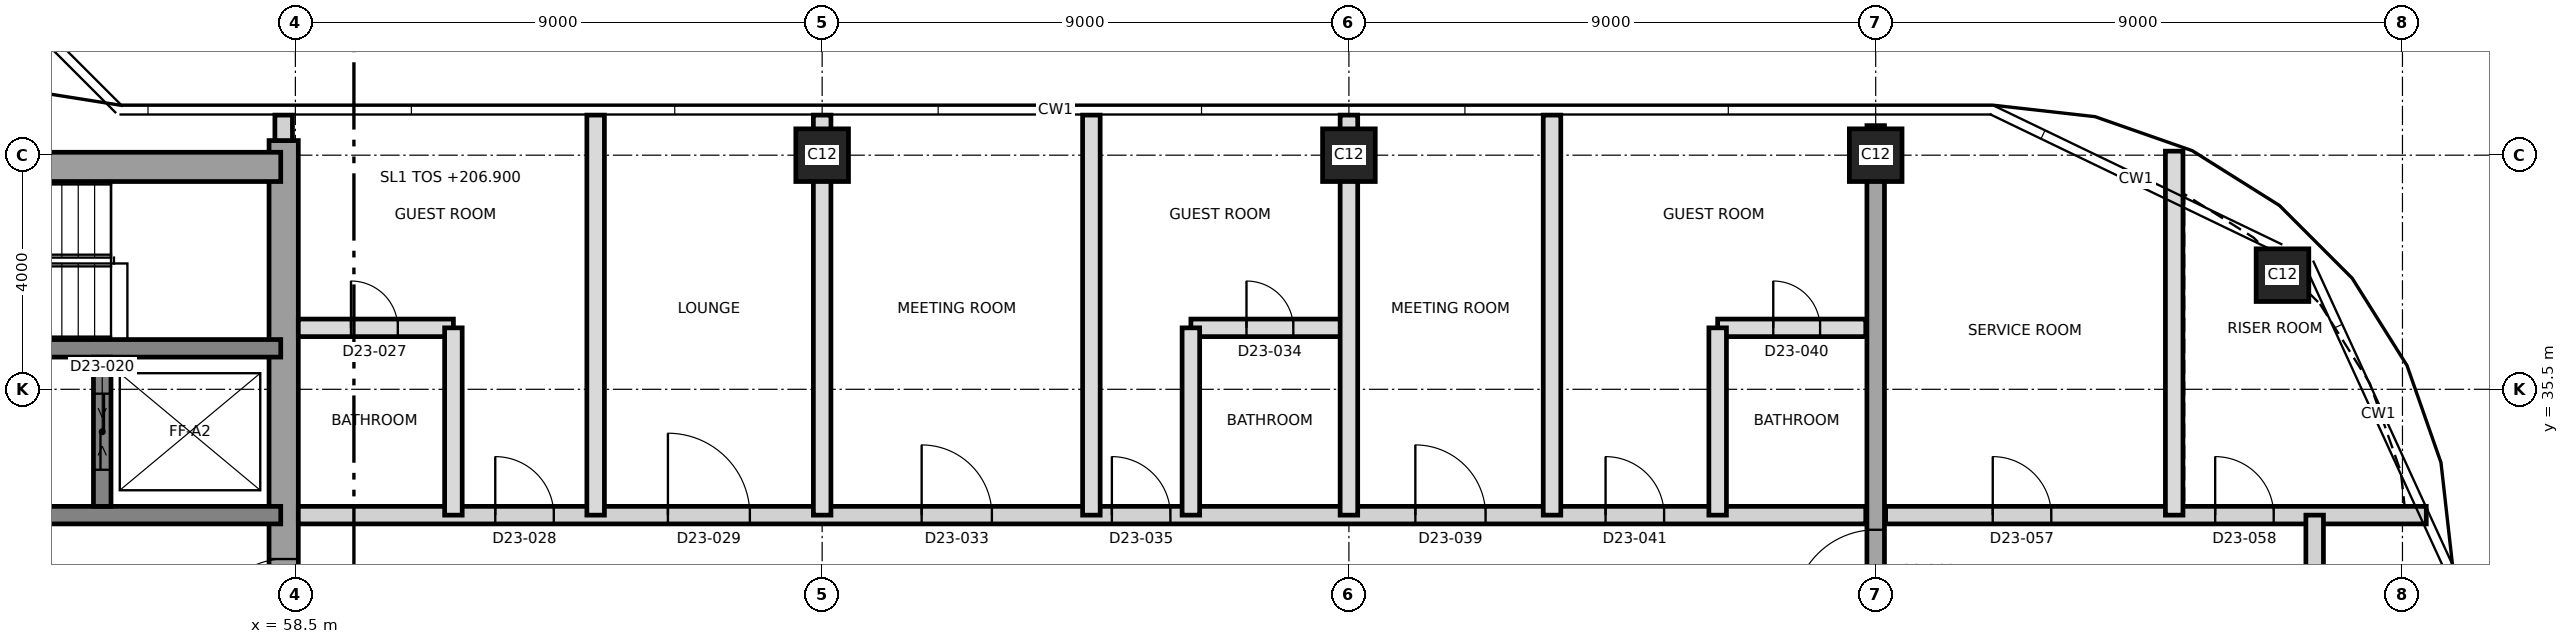
"""IFC4 building model, lengths in metres.
Left out: names, types, materials, properties, quantities, classifications, styles, units other than length and angle.
Written with IfcOpenShell. Run it as: python <this file> out.ifc"""

import sys

from ifc_helpers import new_model, si_unit, direction, frame, frame_2d, origin, origin_2d, place, context, subcontext, project, spatial, rectangle, extrude, element, fill, save


model = new_model("IFC4")
c1 = context("Model", 3, precision=1e-05, world=origin(), true_north=direction((0.0, 1.0)))
c2 = subcontext(c1, "Body", "Model", "MODEL_VIEW")
j1 = project(units=[si_unit("LENGTHUNIT", "METRE"), si_unit("PLANEANGLEUNIT", "RADIAN")], contexts=[c1])
p1 = place(None, origin())
s1 = spatial("IfcSite", under=j1, at=p1, CompositionType="ELEMENT")
p2 = place(p1, origin())
s2 = spatial("IfcBuilding", under=s1, at=p2, CompositionType="ELEMENT")
p3 = place(p2, frame((0.0, 0.0, 206.9)))
s3 = spatial("IfcBuildingStorey", under=s2, at=p3, CompositionType="ELEMENT", Elevation=206.9)
p4 = place(p3, frame((58.3, 21.25, 0.0), z_axis=(0.0, 0.0, 1.0), x_axis=(0.0, 1.0, 0.0)))
e1 = element("IfcWall", 1, at=p4, inside=s3, PredefinedType="SHEAR", context=c2, shape_type="SweptSolid", body=[
    extrude(rectangle(XDim=18.5, YDim=0.5, at=frame_2d((9.25, 0.0))), origin(), (0.0, 0.0, 1.0), 3.7),
])
p5 = place(p4, frame((10.15, 0.0, 0.0)))
e2 = element("IfcOpeningElement", 2, at=p5, cuts=e1, PredefinedType="OPENING", context=c2, shape_type="SweptSolid", body=[
    extrude(rectangle(XDim=1.2, YDim=2.1, at=frame_2d((0.6, 1.05))), frame((0.0, 0.26, 0.0), z_axis=(0.0, -1.0, 0.0), x_axis=(1.0, 0.0, 0.0)), (0.0, 0.0, 1.0), 0.52),
])
p6 = place(p3, frame((31.25, 39.3, 0.0), z_axis=(0.0, 0.0, 1.0), x_axis=(1.0, 0.0, 0.0)))
e3 = element("IfcWall", 3, at=p6, inside=s3, PredefinedType="SHEAR", context=c2, shape_type="SweptSolid", body=[
    extrude(rectangle(XDim=27.0, YDim=0.5, at=frame_2d((13.5, 0.0))), origin(), (0.0, 0.0, 1.0), 3.7),
])
p7 = place(p6, frame((10.45, 0.0, 0.0)))
e4 = element("IfcOpeningElement", 4, at=p7, cuts=e3, PredefinedType="OPENING", context=c2, shape_type="SweptSolid", body=[
    extrude(rectangle(XDim=1.2, YDim=2.1, at=frame_2d((0.6, 1.05))), frame((0.0, 0.26, 0.0), z_axis=(0.0, -1.0, 0.0), x_axis=(1.0, 0.0, 0.0)), (0.0, 0.0, 1.0), 0.52),
])
p8 = place(p3, frame((31.75, 33.35, 0.0), z_axis=(0.0, 0.0, 1.0), x_axis=(1.0, 0.0, 0.0)))
e5 = element("IfcWall", 5, at=p8, inside=s3, PredefinedType="SHEAR", context=c2, shape_type="SweptSolid", body=[
    extrude(rectangle(XDim=26.5, YDim=0.3, at=frame_2d((13.25, 0.0))), origin(), (0.0, 0.0, 1.0), 3.7),
])
p9 = place(p8, frame((13.9, 0.0, 0.0)))
e6 = element("IfcOpeningElement", 6, at=p9, cuts=e5, PredefinedType="OPENING", context=c2, shape_type="SweptSolid", body=[
    extrude(rectangle(XDim=1.4, YDim=2.1, at=frame_2d((0.7, 1.05))), frame((0.0, 0.16, 0.0), z_axis=(0.0, -1.0, 0.0), x_axis=(1.0, 0.0, 0.0)), (0.0, 0.0, 1.0), 0.32),
])
p10 = place(p8, frame((5.375, 0.0, 0.0)))
e7 = element("IfcOpeningElement", 7, at=p10, cuts=e5, PredefinedType="OPENING", context=c2, shape_type="SweptSolid", body=[
    extrude(rectangle(XDim=1.2, YDim=2.1, at=frame_2d((0.6, 1.05))), frame((0.0, 0.16, 0.0), z_axis=(0.0, -1.0, 0.0), x_axis=(1.0, 0.0, 0.0)), (0.0, 0.0, 1.0), 0.32),
])
p11 = place(p8, frame((19.925, 0.0, 0.0)))
e8 = element("IfcOpeningElement", 8, at=p11, cuts=e5, PredefinedType="OPENING", context=c2, shape_type="SweptSolid", body=[
    extrude(rectangle(XDim=1.2, YDim=2.1, at=frame_2d((0.6, 1.05))), frame((0.0, 0.16, 0.0), z_axis=(0.0, -1.0, 0.0), x_axis=(1.0, 0.0, 0.0)), (0.0, 0.0, 1.0), 0.32),
])
p12 = place(p3, frame((43.5, 36.2, 0.0), z_axis=(0.0, 0.0, 1.0), x_axis=(1.0, 0.0, 0.0)))
e9 = element("IfcWall", 9, at=p12, inside=s3, PredefinedType="SHEAR", context=c2, shape_type="SweptSolid", body=[
    extrude(rectangle(XDim=14.75, YDim=0.3, at=frame_2d((7.375, 0.0))), origin(), (0.0, 0.0, 1.0), 3.7),
])
p13 = place(p12, frame((6.9, 0.0, 0.0)))
e10 = element("IfcOpeningElement", 10, at=p13, cuts=e9, PredefinedType="OPENING", context=c2, shape_type="SweptSolid", body=[
    extrude(rectangle(XDim=1.2, YDim=2.1, at=frame_2d((0.6, 1.05))), frame((0.0, 0.16, 0.0), z_axis=(0.0, -1.0, 0.0), x_axis=(1.0, 0.0, 0.0)), (0.0, 0.0, 1.0), 0.32),
])
p14 = place(p12, frame((0.7, 0.0, 0.0)))
e11 = element("IfcOpeningElement", 11, at=p14, cuts=e9, PredefinedType="OPENING", context=c2, shape_type="SweptSolid", body=[
    extrude(rectangle(XDim=1.3, YDim=2.4, at=frame_2d((0.65, 1.2))), frame((0.0, 0.16, 0.0), z_axis=(0.0, -1.0, 0.0), x_axis=(1.0, 0.0, 0.0)), (0.0, 0.0, 1.0), 0.32),
])
p15 = place(p12, frame((3.7, 0.0, 0.0)))
e12 = element("IfcOpeningElement", 12, at=p15, cuts=e9, PredefinedType="OPENING", context=c2, shape_type="SweptSolid", body=[
    extrude(rectangle(XDim=1.3, YDim=2.4, at=frame_2d((0.65, 1.2))), frame((0.0, 0.16, 0.0), z_axis=(0.0, -1.0, 0.0), x_axis=(1.0, 0.0, 0.0)), (0.0, 0.0, 1.0), 0.32),
])
p16 = place(p3, frame((55.2, 33.5, 0.0), z_axis=(0.0, 0.0, 1.0), x_axis=(0.0, 1.0, 0.0)))
e13 = element("IfcWall", 13, at=p16, inside=s3, PredefinedType="SHEAR", context=c2, shape_type="SweptSolid", body=[
    extrude(rectangle(XDim=2.55, YDim=0.3, at=frame_2d((1.275, 0.0))), origin(), (0.0, 0.0, 1.0), 3.7),
])
p17 = place(p16, frame((0.625, 0.0, 0.0)))
e14 = element("IfcOpeningElement", 14, at=p17, cuts=e13, PredefinedType="OPENING", context=c2, shape_type="SweptSolid", body=[
    extrude(rectangle(XDim=1.3, YDim=2.4, at=frame_2d((0.65, 1.2))), frame((0.0, 0.16, 0.0), z_axis=(0.0, -1.0, 0.0), x_axis=(1.0, 0.0, 0.0)), (0.0, 0.0, 1.0), 0.32),
])
for number, where, z_axis, x_axis in (
    (15, (92.45, 37.45, 0.0), (0.0, 0.0, 1.0), (1.0, 0.0, 0.0)),
    (16, (67.5, 39.5, 0.0), (0.0, 0.0, 1.0), (1.0, 0.0, 0.0)),
    (17, (76.5, 39.5, 0.0), (0.0, 0.0, 1.0), (1.0, 0.0, 0.0)),
    (18, (85.5, 39.5, 0.0), (0.0, 0.0, 1.0), (1.0, 0.0, 0.0)),
):
    element("IfcColumn", number, at=place(p3, frame(where, z_axis=z_axis, x_axis=x_axis)), inside=s3, PredefinedType="COLUMN", context=c2, shape_type="SweptSolid", body=[
        extrude(rectangle(XDim=0.9, YDim=0.9, at=origin_2d()), origin(), (0.0, 0.0, 1.0), 3.7),
    ])
p18 = place(p3, frame((85.5, 20.995, 0.0), z_axis=(0.0, 0.0, 1.0), x_axis=(0.0, 1.0, 0.0)))
e19 = element("IfcWall", 19, at=p18, inside=s3, PredefinedType="SHEAR", context=c2, shape_type="SweptSolid", body=[
    extrude(rectangle(XDim=19.01, YDim=0.3, at=frame_2d((9.505, 0.0))), origin(), (0.0, 0.0, 1.0), 3.7),
])
p19 = place(p18, frame((10.705, 0.0, 0.0)))
e20 = element("IfcOpeningElement", 20, at=p19, cuts=e19, PredefinedType="OPENING", context=c2, shape_type="SweptSolid", body=[
    extrude(rectangle(XDim=1.4, YDim=2.1, at=frame_2d((0.7, 1.05))), frame((0.0, 0.16, 0.0), z_axis=(0.0, -1.0, 0.0), x_axis=(1.0, 0.0, 0.0)), (0.0, 0.0, 1.0), 0.32),
])
p20 = place(p3, frame((58.55, 33.35, 0.0), z_axis=(0.0, 0.0, 1.0), x_axis=(1.0, 0.0, 0.0)))
e21 = element("IfcWall", 21, at=p20, inside=s3, PredefinedType="PARTITIONING", context=c2, shape_type="SweptSolid", body=[
    extrude(rectangle(XDim=26.78, YDim=0.3, at=frame_2d((13.39, 0.0))), origin(), (0.0, 0.0, 1.0), 3.4),
])
p21 = place(p20, frame((3.365, 0.0, 0.0)))
e22 = element("IfcOpeningElement", 22, at=p21, cuts=e21, PredefinedType="OPENING", context=c2, shape_type="SweptSolid", body=[
    extrude(rectangle(XDim=1.0, YDim=2.1, at=frame_2d((0.5, 1.05))), frame((0.0, 0.16, 0.0), z_axis=(0.0, -1.0, 0.0), x_axis=(1.0, 0.0, 0.0)), (0.0, 0.0, 1.0), 0.32),
])
p22 = place(p20, frame((6.315, 0.0, 0.0)))
e23 = element("IfcOpeningElement", 23, at=p22, cuts=e21, PredefinedType="OPENING", context=c2, shape_type="SweptSolid", body=[
    extrude(rectangle(XDim=1.4, YDim=2.1, at=frame_2d((0.7, 1.05))), frame((0.0, 0.16, 0.0), z_axis=(0.0, -1.0, 0.0), x_axis=(1.0, 0.0, 0.0)), (0.0, 0.0, 1.0), 0.32),
])
p23 = place(p20, frame((10.65, 0.0, 0.0)))
e24 = element("IfcOpeningElement", 24, at=p23, cuts=e21, PredefinedType="OPENING", context=c2, shape_type="SweptSolid", body=[
    extrude(rectangle(XDim=1.2, YDim=2.1, at=frame_2d((0.6, 1.05))), frame((0.0, 0.16, 0.0), z_axis=(0.0, -1.0, 0.0), x_axis=(1.0, 0.0, 0.0)), (0.0, 0.0, 1.0), 0.32),
])
p24 = place(p20, frame((13.9, 0.0, 0.0)))
e25 = element("IfcOpeningElement", 25, at=p24, cuts=e21, PredefinedType="OPENING", context=c2, shape_type="SweptSolid", body=[
    extrude(rectangle(XDim=1.0, YDim=2.1, at=frame_2d((0.5, 1.05))), frame((0.0, 0.16, 0.0), z_axis=(0.0, -1.0, 0.0), x_axis=(1.0, 0.0, 0.0)), (0.0, 0.0, 1.0), 0.32),
])
p25 = place(p20, frame((19.085, 0.0, 0.0)))
e26 = element("IfcOpeningElement", 26, at=p25, cuts=e21, PredefinedType="OPENING", context=c2, shape_type="SweptSolid", body=[
    extrude(rectangle(XDim=1.2, YDim=2.1, at=frame_2d((0.6, 1.05))), frame((0.0, 0.16, 0.0), z_axis=(0.0, -1.0, 0.0), x_axis=(1.0, 0.0, 0.0)), (0.0, 0.0, 1.0), 0.32),
])
p26 = place(p20, frame((22.335, 0.0, 0.0)))
e27 = element("IfcOpeningElement", 27, at=p26, cuts=e21, PredefinedType="OPENING", context=c2, shape_type="SweptSolid", body=[
    extrude(rectangle(XDim=1.0, YDim=2.1, at=frame_2d((0.5, 1.05))), frame((0.0, 0.16, 0.0), z_axis=(0.0, -1.0, 0.0), x_axis=(1.0, 0.0, 0.0)), (0.0, 0.0, 1.0), 0.32),
])
p27 = place(p3, frame((85.67, 33.35, 0.0), z_axis=(0.0, 0.0, 1.0), x_axis=(1.0, 0.0, 0.0)))
e28 = element("IfcWall", 28, at=p27, inside=s3, PredefinedType="PARTITIONING", context=c2, shape_type="SweptSolid", body=[
    extrude(rectangle(XDim=9.237, YDim=0.3, at=frame_2d((4.619, 0.0))), origin(), (0.0, 0.0, 1.0), 3.4),
])
p28 = place(p27, frame((1.83, 0.0, 0.0)))
e29 = element("IfcOpeningElement", 29, at=p28, cuts=e28, PredefinedType="OPENING", context=c2, shape_type="SweptSolid", body=[
    extrude(rectangle(XDim=1.0, YDim=2.1, at=frame_2d((0.5, 1.05))), frame((0.0, 0.16, 0.0), z_axis=(0.0, -1.0, 0.0), x_axis=(1.0, 0.0, 0.0)), (0.0, 0.0, 1.0), 0.32),
])
p29 = place(p27, frame((5.63, 0.0, 0.0)))
e30 = element("IfcOpeningElement", 30, at=p29, cuts=e28, PredefinedType="OPENING", context=c2, shape_type="SweptSolid", body=[
    extrude(rectangle(XDim=1.0, YDim=2.1, at=frame_2d((0.5, 1.05))), frame((0.0, 0.16, 0.0), z_axis=(0.0, -1.0, 0.0), x_axis=(1.0, 0.0, 0.0)), (0.0, 0.0, 1.0), 0.32),
])
p30 = place(p3, frame((58.55, 36.55, 0.0), z_axis=(0.0, 0.0, 1.0), x_axis=(1.0, 0.0, 0.0)))
e31 = element("IfcWall", 31, at=p30, inside=s3, PredefinedType="PARTITIONING", context=c2, shape_type="SweptSolid", body=[
    extrude(rectangle(XDim=2.65, YDim=0.3, at=frame_2d((1.325, 0.0))), origin(), (0.0, 0.0, 1.0), 3.4),
])
p31 = place(p30, frame((0.9, 0.0, 0.0)))
e32 = element("IfcOpeningElement", 32, at=p31, cuts=e31, PredefinedType="OPENING", context=c2, shape_type="SweptSolid", body=[
    extrude(rectangle(XDim=0.8, YDim=2.1, at=frame_2d((0.4, 1.05))), frame((0.0, 0.16, 0.0), z_axis=(0.0, -1.0, 0.0), x_axis=(1.0, 0.0, 0.0)), (0.0, 0.0, 1.0), 0.32),
])
p32 = place(p3, frame((73.8, 36.55, 0.0), z_axis=(0.0, 0.0, 1.0), x_axis=(1.0, 0.0, 0.0)))
e33 = element("IfcWall", 33, at=p32, inside=s3, PredefinedType="PARTITIONING", context=c2, shape_type="SweptSolid", body=[
    extrude(rectangle(XDim=2.7, YDim=0.3, at=frame_2d((1.35, 0.0))), origin(), (0.0, 0.0, 1.0), 3.4),
])
p33 = place(p32, frame((0.95, 0.0, 0.0)))
e34 = element("IfcOpeningElement", 34, at=p33, cuts=e33, PredefinedType="OPENING", context=c2, shape_type="SweptSolid", body=[
    extrude(rectangle(XDim=0.8, YDim=2.1, at=frame_2d((0.4, 1.05))), frame((0.0, 0.16, 0.0), z_axis=(0.0, -1.0, 0.0), x_axis=(1.0, 0.0, 0.0)), (0.0, 0.0, 1.0), 0.32),
])
p34 = place(p3, frame((82.8, 36.55, 0.0), z_axis=(0.0, 0.0, 1.0), x_axis=(1.0, 0.0, 0.0)))
e35 = element("IfcWall", 35, at=p34, inside=s3, PredefinedType="PARTITIONING", context=c2, shape_type="SweptSolid", body=[
    extrude(rectangle(XDim=2.53, YDim=0.3, at=frame_2d((1.265, 0.0))), origin(), (0.0, 0.0, 1.0), 3.4),
])
p35 = place(p34, frame((0.95, 0.0, 0.0)))
e36 = element("IfcOpeningElement", 36, at=p35, cuts=e35, PredefinedType="OPENING", context=c2, shape_type="SweptSolid", body=[
    extrude(rectangle(XDim=0.8, YDim=2.1, at=frame_2d((0.4, 1.05))), frame((0.0, 0.16, 0.0), z_axis=(0.0, -1.0, 0.0), x_axis=(1.0, 0.0, 0.0)), (0.0, 0.0, 1.0), 0.32),
])
p36 = place(p3, frame((61.2, 33.35, 0.0), z_axis=(0.0, 0.0, 1.0), x_axis=(0.0, 1.0, 0.0)))
e37 = element("IfcWall", 37, at=p36, inside=s3, PredefinedType="PARTITIONING", context=c2, shape_type="SweptSolid", body=[
    extrude(rectangle(XDim=3.2, YDim=0.3, at=frame_2d((1.6, 0.0))), origin(), (0.0, 0.0, 1.0), 3.4),
])
for number, where, z_axis, x_axis in (
    (38, (63.63, 33.35, 0.0), (0.0, 0.0, 1.0), (0.0, 1.0, 0.0)),
    (39, (67.5, 33.35, 0.0), (0.0, 0.0, 1.0), (0.0, 1.0, 0.0)),
    (40, (72.1, 33.35, 0.0), (0.0, 0.0, 1.0), (0.0, 1.0, 0.0)),
):
    element("IfcWall", number, at=place(p3, frame(where, z_axis=z_axis, x_axis=x_axis)), inside=s3, PredefinedType="PARTITIONING", context=c2, shape_type="SweptSolid", body=[
        extrude(rectangle(XDim=6.835, YDim=0.3, at=frame_2d((3.417, 0.0))), origin(), (0.0, 0.0, 1.0), 3.4),
    ])
p37 = place(p3, frame((73.8, 33.35, 0.0), z_axis=(0.0, 0.0, 1.0), x_axis=(0.0, 1.0, 0.0)))
e41 = element("IfcWall", 41, at=p37, inside=s3, PredefinedType="PARTITIONING", context=c2, shape_type="SweptSolid", body=[
    extrude(rectangle(XDim=3.2, YDim=0.3, at=frame_2d((1.6, 0.0))), origin(), (0.0, 0.0, 1.0), 3.4),
])
for number, where, z_axis, x_axis in (
    (42, (76.5, 33.35, 0.0), (0.0, 0.0, 1.0), (0.0, 1.0, 0.0)),
    (43, (79.97, 33.35, 0.0), (0.0, 0.0, 1.0), (0.0, 1.0, 0.0)),
):
    element("IfcWall", number, at=place(p3, frame(where, z_axis=z_axis, x_axis=x_axis)), inside=s3, PredefinedType="PARTITIONING", context=c2, shape_type="SweptSolid", body=[
        extrude(rectangle(XDim=6.835, YDim=0.3, at=frame_2d((3.417, 0.0))), origin(), (0.0, 0.0, 1.0), 3.4),
    ])
p38 = place(p3, frame((82.8, 33.35, 0.0), z_axis=(0.0, 0.0, 1.0), x_axis=(0.0, 1.0, 0.0)))
e44 = element("IfcWall", 44, at=p38, inside=s3, PredefinedType="PARTITIONING", context=c2, shape_type="SweptSolid", body=[
    extrude(rectangle(XDim=3.2, YDim=0.3, at=frame_2d((1.6, 0.0))), origin(), (0.0, 0.0, 1.0), 3.4),
])
p39 = place(p3, frame((90.6, 33.35, 0.0), z_axis=(0.0, 0.0, 1.0), x_axis=(0.0, 1.0, 0.0)))
e45 = element("IfcWall", 45, at=p39, inside=s3, PredefinedType="PARTITIONING", context=c2, shape_type="SweptSolid", body=[
    extrude(rectangle(XDim=6.219, YDim=0.3, at=frame_2d((3.109, 0.0))), origin(), (0.0, 0.0, 1.0), 3.4),
])
p40 = place(p3, frame((93.0, 30.65, 0.0), z_axis=(0.0, 0.0, 1.0), x_axis=(0.0, 1.0, 0.0)))
e46 = element("IfcWall", 46, at=p40, inside=s3, PredefinedType="PARTITIONING", context=c2, shape_type="SweptSolid", body=[
    extrude(rectangle(XDim=2.7, YDim=0.3, at=frame_2d((1.35, 0.0))), origin(), (0.0, 0.0, 1.0), 3.4),
])
p41 = place(p3, frame((58.3, 39.75, 0.0), z_axis=(0.0, 0.0, 1.0), x_axis=(0.0, 1.0, 0.0)))
e47 = element("IfcWall", 47, at=p41, inside=s3, PredefinedType="PARTITIONING", context=c2, shape_type="SweptSolid", body=[
    extrude(rectangle(XDim=0.435, YDim=0.3, at=frame_2d((0.218, 0.0))), origin(), (0.0, 0.0, 1.0), 3.4),
])
p42 = place(p5, origin())
e48 = element("IfcDoor", 48, at=p42, inside=s3, OperationType="SINGLE_SWING_LEFT", PredefinedType="DOOR", context=c2, shape_type="SweptSolid", body=[
    extrude(rectangle(XDim=1.2, YDim=2.1, at=frame_2d((0.6, 1.05))), frame((0.0, 0.025, 0.0), z_axis=(0.0, -1.0, 0.0), x_axis=(1.0, 0.0, 0.0)), (0.0, 0.0, 1.0), 0.05),
])
fill(e2, e48)
p43 = place(p17, origin())
e49 = element("IfcDoor", 49, at=p43, inside=s3, OperationType="SLIDING_TO_LEFT", PredefinedType="DOOR", context=c2, shape_type="SweptSolid", body=[
    extrude(rectangle(XDim=1.3, YDim=2.4, at=frame_2d((0.65, 1.2))), frame((0.0, 0.025, 0.0), z_axis=(0.0, -1.0, 0.0), x_axis=(1.0, 0.0, 0.0)), (0.0, 0.0, 1.0), 0.05),
])
fill(e14, e49)
p44 = place(p31, origin())
e50 = element("IfcDoor", 50, at=p44, inside=s3, OperationType="SINGLE_SWING_LEFT", PredefinedType="DOOR", context=c2, shape_type="SweptSolid", body=[
    extrude(rectangle(XDim=0.8, YDim=2.1, at=frame_2d((0.4, 1.05))), frame((0.0, 0.025, 0.0), z_axis=(0.0, -1.0, 0.0), x_axis=(1.0, 0.0, 0.0)), (0.0, 0.0, 1.0), 0.05),
])
fill(e32, e50)
p45 = place(p21, origin())
e51 = element("IfcDoor", 51, at=p45, inside=s3, OperationType="SINGLE_SWING_LEFT", PredefinedType="DOOR", context=c2, shape_type="SweptSolid", body=[
    extrude(rectangle(XDim=1.0, YDim=2.1, at=frame_2d((0.5, 1.05))), frame((0.0, 0.025, 0.0), z_axis=(0.0, -1.0, 0.0), x_axis=(1.0, 0.0, 0.0)), (0.0, 0.0, 1.0), 0.05),
])
fill(e22, e51)
p46 = place(p22, origin())
e52 = element("IfcDoor", 52, at=p46, inside=s3, OperationType="SINGLE_SWING_RIGHT", PredefinedType="DOOR", context=c2, shape_type="SweptSolid", body=[
    extrude(rectangle(XDim=1.4, YDim=2.1, at=frame_2d((0.7, 1.05))), frame((0.0, 0.025, 0.0), z_axis=(0.0, -1.0, 0.0), x_axis=(1.0, 0.0, 0.0)), (0.0, 0.0, 1.0), 0.05),
])
fill(e23, e52)
p47 = place(p23, origin())
e53 = element("IfcDoor", 53, at=p47, inside=s3, OperationType="SINGLE_SWING_LEFT", PredefinedType="DOOR", context=c2, shape_type="SweptSolid", body=[
    extrude(rectangle(XDim=1.2, YDim=2.1, at=frame_2d((0.6, 1.05))), frame((0.0, 0.025, 0.0), z_axis=(0.0, -1.0, 0.0), x_axis=(1.0, 0.0, 0.0)), (0.0, 0.0, 1.0), 0.05),
])
fill(e24, e53)
p48 = place(p33, origin())
e54 = element("IfcDoor", 54, at=p48, inside=s3, OperationType="SINGLE_SWING_RIGHT", PredefinedType="DOOR", context=c2, shape_type="SweptSolid", body=[
    extrude(rectangle(XDim=0.8, YDim=2.1, at=frame_2d((0.4, 1.05))), frame((0.0, 0.025, 0.0), z_axis=(0.0, -1.0, 0.0), x_axis=(1.0, 0.0, 0.0)), (0.0, 0.0, 1.0), 0.05),
])
fill(e34, e54)
p49 = place(p24, origin())
e55 = element("IfcDoor", 55, at=p49, inside=s3, OperationType="SINGLE_SWING_LEFT", PredefinedType="DOOR", context=c2, shape_type="SweptSolid", body=[
    extrude(rectangle(XDim=1.0, YDim=2.1, at=frame_2d((0.5, 1.05))), frame((0.0, 0.025, 0.0), z_axis=(0.0, -1.0, 0.0), x_axis=(1.0, 0.0, 0.0)), (0.0, 0.0, 1.0), 0.05),
])
fill(e25, e55)
p50 = place(p25, origin())
e56 = element("IfcDoor", 56, at=p50, inside=s3, OperationType="SINGLE_SWING_LEFT", PredefinedType="DOOR", context=c2, shape_type="SweptSolid", body=[
    extrude(rectangle(XDim=1.2, YDim=2.1, at=frame_2d((0.6, 1.05))), frame((0.0, 0.025, 0.0), z_axis=(0.0, -1.0, 0.0), x_axis=(1.0, 0.0, 0.0)), (0.0, 0.0, 1.0), 0.05),
])
fill(e26, e56)
p51 = place(p35, origin())
e57 = element("IfcDoor", 57, at=p51, inside=s3, OperationType="SINGLE_SWING_RIGHT", PredefinedType="DOOR", context=c2, shape_type="SweptSolid", body=[
    extrude(rectangle(XDim=0.8, YDim=2.1, at=frame_2d((0.4, 1.05))), frame((0.0, 0.025, 0.0), z_axis=(0.0, -1.0, 0.0), x_axis=(1.0, 0.0, 0.0)), (0.0, 0.0, 1.0), 0.05),
])
fill(e36, e57)
p52 = place(p26, origin())
e58 = element("IfcDoor", 58, at=p52, inside=s3, OperationType="SINGLE_SWING_LEFT", PredefinedType="DOOR", context=c2, shape_type="SweptSolid", body=[
    extrude(rectangle(XDim=1.0, YDim=2.1, at=frame_2d((0.5, 1.05))), frame((0.0, 0.025, 0.0), z_axis=(0.0, -1.0, 0.0), x_axis=(1.0, 0.0, 0.0)), (0.0, 0.0, 1.0), 0.05),
])
fill(e27, e58)
p53 = place(p28, origin())
e59 = element("IfcDoor", 59, at=p53, inside=s3, OperationType="SINGLE_SWING_LEFT", PredefinedType="DOOR", context=c2, shape_type="SweptSolid", body=[
    extrude(rectangle(XDim=1.0, YDim=2.1, at=frame_2d((0.5, 1.05))), frame((0.0, 0.025, 0.0), z_axis=(0.0, -1.0, 0.0), x_axis=(1.0, 0.0, 0.0)), (0.0, 0.0, 1.0), 0.05),
])
fill(e29, e59)
p54 = place(p29, origin())
e60 = element("IfcDoor", 60, at=p54, inside=s3, OperationType="SINGLE_SWING_RIGHT", PredefinedType="DOOR", context=c2, shape_type="SweptSolid", body=[
    extrude(rectangle(XDim=1.0, YDim=2.1, at=frame_2d((0.5, 1.05))), frame((0.0, 0.025, 0.0), z_axis=(0.0, -1.0, 0.0), x_axis=(1.0, 0.0, 0.0)), (0.0, 0.0, 1.0), 0.05),
])
fill(e30, e60)
p55 = place(p19, origin())
e61 = element("IfcDoor", 61, at=p55, inside=s3, OperationType="SINGLE_SWING_RIGHT", PredefinedType="DOOR", context=c2, shape_type="SweptSolid", body=[
    extrude(rectangle(XDim=1.4, YDim=2.1, at=frame_2d((0.7, 1.05))), frame((0.0, 0.025, 0.0), z_axis=(0.0, -1.0, 0.0), x_axis=(1.0, 0.0, 0.0)), (0.0, 0.0, 1.0), 0.05),
])
fill(e20, e61)
save(model, sys.argv[1])
